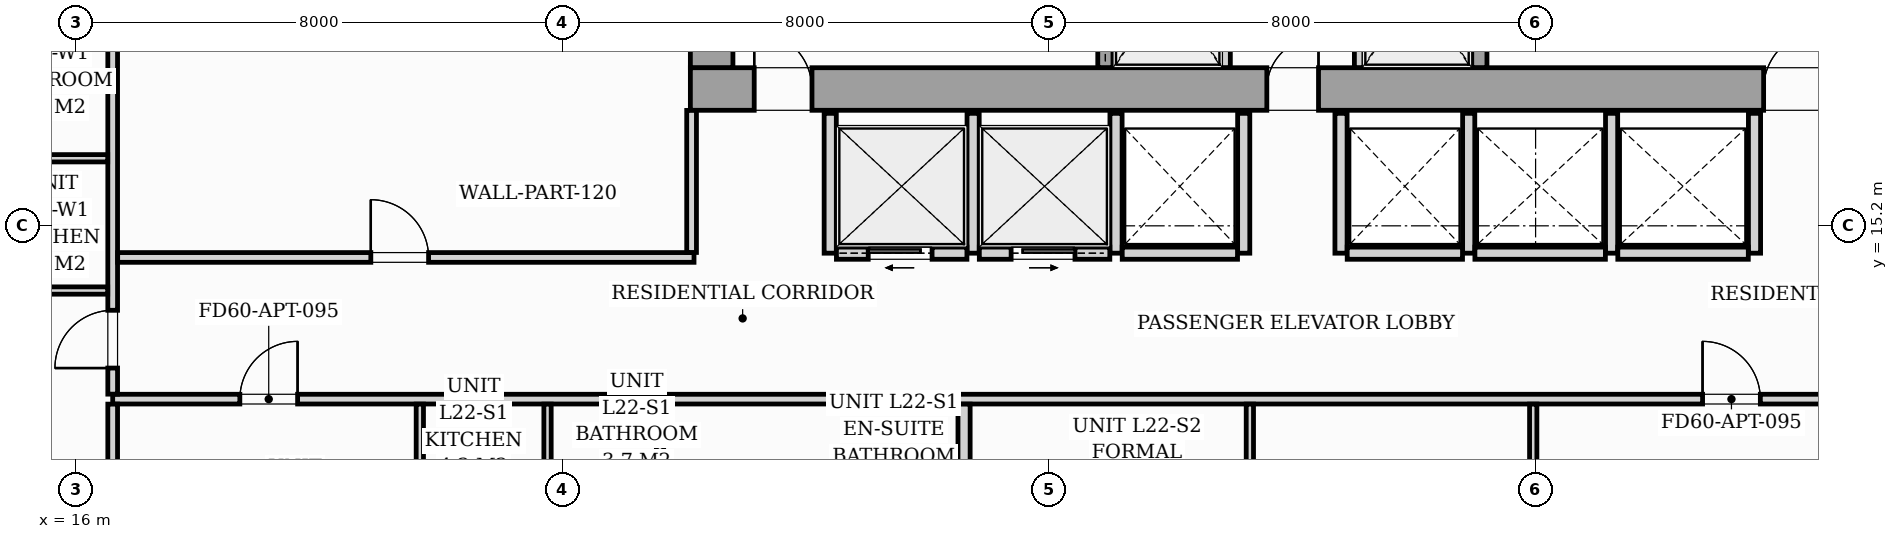
"""IFC4 building model, lengths in metres.
Left out: names, types, materials, properties, quantities, classifications, styles, units other than length and angle.
Written with IfcOpenShell. Run it as: python <this file> out.ifc"""

import sys

from ifc_helpers import new_model, si_unit, direction, frame, frame_2d, origin, origin_2d, place, context, subcontext, project, spatial, rectangle, i_section, extrude, source, transform, mapped, element, fill, save


model = new_model("IFC4")
c1 = context("Model", 3, precision=1e-05, world=origin(), true_north=direction((0.0, 1.0)))
c2 = subcontext(c1, "Body", "Model", "MODEL_VIEW")
j1 = project(units=[si_unit("LENGTHUNIT", "METRE"), si_unit("PLANEANGLEUNIT", "RADIAN")], contexts=[c1])
p1 = place(None, origin())
s1 = spatial("IfcSite", under=j1, at=p1, CompositionType="ELEMENT")
p2 = place(p1, origin())
s2 = spatial("IfcBuilding", under=s1, at=p2, CompositionType="ELEMENT")
p3 = place(p2, frame((0.0, 0.0, 81.0)))
s3 = spatial("IfcBuildingStorey", under=s2, at=p3, CompositionType="ELEMENT", Elevation=81.0)
m1 = source(origin(), c2, "Body", "SweptSolid", [
    extrude(i_section(OverallWidth=0.427, OverallDepth=0.483, WebThickness=0.051, FlangeThickness=0.082, FilletRadius=0.018, at=origin_2d()), origin(), (0.0, 0.0, 1.0), 3.196),
])
for number, where, z_axis, x_axis in (
    (1, (26.4, 17.4, 0.002), (0.0, 0.0, 1.0), (1.0, 0.0, 0.0)),
    (2, (33.12, 17.4, 0.002), (0.0, 0.0, 1.0), (1.0, 0.0, 0.0)),
    (3, (38.88, 17.4, 0.002), (0.0, 0.0, 1.0), (1.0, 0.0, 0.0)),
):
    element("IfcColumn", number, at=place(p3, frame(where, z_axis=z_axis, x_axis=x_axis)), inside=s3, PredefinedType="PILASTER", context=c2, shape_type="MappedRepresentation", body=[
        mapped(m1, transform((0.0, 0.0, 0.0), scale=1.0)),
    ])
p4 = place(p3, frame((26.1, 17.45, 0.0), z_axis=(0.0, 0.0, 1.0), x_axis=(1.0, 0.0, 0.0)))
e4 = element("IfcWall", 4, at=p4, inside=s3, PredefinedType="SHEAR", context=c2, shape_type="SweptSolid", body=[
    extrude(rectangle(XDim=19.8, YDim=0.7, at=frame_2d((9.9, 0.0))), origin(), (0.0, 0.0, 1.0), 3.2),
])
p5 = place(p4, frame((1.05, 0.0, 0.0)))
e5 = element("IfcOpeningElement", 5, at=p5, cuts=e4, PredefinedType="OPENING", context=c2, shape_type="SweptSolid", body=[
    extrude(rectangle(XDim=0.95, YDim=2.06, at=frame_2d((0.475, 1.03))), frame((0.0, 0.36, 0.0), z_axis=(0.0, -1.0, 0.0), x_axis=(1.0, 0.0, 0.0)), (0.0, 0.0, 1.0), 0.72),
])
p6 = place(p4, frame((9.48, 0.0, 0.0)))
e6 = element("IfcOpeningElement", 6, at=p6, cuts=e4, PredefinedType="OPENING", context=c2, shape_type="SweptSolid", body=[
    extrude(rectangle(XDim=0.85, YDim=2.0, at=frame_2d((0.425, 1.0))), frame((0.0, 0.36, 0.0), z_axis=(0.0, -1.0, 0.0), x_axis=(1.0, 0.0, 0.0)), (0.0, 0.0, 1.0), 0.72),
])
p7 = place(p4, frame((17.65, 0.0, 0.0)))
e7 = element("IfcOpeningElement", 7, at=p7, cuts=e4, PredefinedType="OPENING", context=c2, shape_type="SweptSolid", body=[
    extrude(rectangle(XDim=0.95, YDim=2.06, at=frame_2d((0.475, 1.03))), frame((0.0, 0.36, 0.0), z_axis=(0.0, -1.0, 0.0), x_axis=(1.0, 0.0, 0.0)), (0.0, 0.0, 1.0), 0.72),
])
p8 = place(p3, frame((26.45, 17.802, 0.0), z_axis=(0.0, 0.0, 1.0), x_axis=(0.0, 1.0, 0.0)))
e8 = element("IfcWall", 8, at=p8, inside=s3, PredefinedType="SHEAR", context=c2, shape_type="SweptSolid", body=[
    extrude(rectangle(XDim=5.796, YDim=0.7, at=frame_2d((2.898, 0.0))), origin(), (0.0, 0.0, 1.0), 3.2),
])
p9 = place(p3, frame((32.925, 17.802, 0.0), z_axis=(0.0, 0.0, 1.0), x_axis=(0.0, 1.0, 0.0)))
e9 = element("IfcWall", 9, at=p9, inside=s3, PredefinedType="SOLIDWALL", context=c2, shape_type="SweptSolid", body=[
    extrude(rectangle(XDim=2.646, YDim=0.25, at=frame_2d((1.323, 0.0))), origin(), (0.0, 0.0, 1.0), 3.2),
])
p10 = place(p9, frame((0.598, 0.0, 0.0)))
e10 = element("IfcOpeningElement", 10, at=p10, cuts=e9, PredefinedType="OPENING", context=c2, shape_type="SweptSolid", body=[
    extrude(rectangle(XDim=1.1, YDim=2.08, at=frame_2d((0.55, 1.04))), frame((0.0, 0.135, 0.0), z_axis=(0.0, -1.0, 0.0), x_axis=(1.0, 0.0, 0.0)), (0.0, 0.0, 1.0), 0.27),
])
for number, where, z_axis, x_axis in (
    (11, (34.9, 17.802, 0.0), (0.0, 0.0, 1.0), (0.0, 1.0, 0.0)),
    (12, (37.1, 17.802, 0.0), (0.0, 0.0, 1.0), (0.0, 1.0, 0.0)),
):
    element("IfcWall", number, at=place(p3, frame(where, z_axis=z_axis, x_axis=x_axis)), inside=s3, PredefinedType="PARTITIONING", context=c2, shape_type="SweptSolid", body=[
        extrude(rectangle(XDim=2.646, YDim=0.16, at=frame_2d((1.323, 0.0))), origin(), (0.0, 0.0, 1.0), 2.94),
    ])
p11 = place(p3, frame((39.075, 17.802, 0.0), z_axis=(0.0, 0.0, 1.0), x_axis=(0.0, 1.0, 0.0)))
e13 = element("IfcWall", 13, at=p11, inside=s3, PredefinedType="SOLIDWALL", context=c2, shape_type="SweptSolid", body=[
    extrude(rectangle(XDim=2.646, YDim=0.25, at=frame_2d((1.323, 0.0))), origin(), (0.0, 0.0, 1.0), 3.2),
])
p12 = place(p11, frame((0.598, 0.0, 0.0)))
e14 = element("IfcOpeningElement", 14, at=p12, cuts=e13, PredefinedType="OPENING", context=c2, shape_type="SweptSolid", body=[
    extrude(rectangle(XDim=1.1, YDim=2.08, at=frame_2d((0.55, 1.04))), frame((0.0, 0.135, 0.0), z_axis=(0.0, -1.0, 0.0), x_axis=(1.0, 0.0, 0.0)), (0.0, 0.0, 1.0), 0.27),
])
for number, where, z_axis, x_axis in (
    (15, (28.4, 14.75, 0.0), (0.0, 0.0, 1.0), (0.0, 1.0, 0.0)),
    (16, (30.75, 14.75, 0.0), (0.0, 0.0, 1.0), (0.0, 1.0, 0.0)),
    (17, (33.1, 14.75, 0.0), (0.0, 0.0, 1.0), (0.0, 1.0, 0.0)),
):
    element("IfcWall", number, at=place(p3, frame(where, z_axis=z_axis, x_axis=x_axis)), inside=s3, PredefinedType="PARTITIONING", context=c2, shape_type="SweptSolid", body=[
        extrude(rectangle(XDim=2.3, YDim=0.2, at=frame_2d((1.15, 0.0))), origin(), (0.0, 0.0, 1.0), 2.94),
    ])
p13 = place(p3, frame((28.502, 14.75, 0.0), z_axis=(0.0, 0.0, 1.0), x_axis=(1.0, 0.0, 0.0)))
e18 = element("IfcWall", 18, at=p13, inside=s3, PredefinedType="PARTITIONING", context=c2, shape_type="SweptSolid", body=[
    extrude(rectangle(XDim=2.146, YDim=0.2, at=frame_2d((1.073, 0.0))), origin(), (0.0, 0.0, 1.0), 2.94),
])
p14 = place(p13, frame((0.523, 0.0, 0.0)))
e19 = element("IfcOpeningElement", 19, at=p14, cuts=e18, PredefinedType="OPENING", context=c2, shape_type="SweptSolid", body=[
    extrude(rectangle(XDim=1.05, YDim=2.08, at=frame_2d((0.525, 1.04))), frame((0.0, 0.11, 0.0), z_axis=(0.0, -1.0, 0.0), x_axis=(1.0, 0.0, 0.0)), (0.0, 0.0, 1.0), 0.22),
])
p15 = place(p3, frame((30.852, 14.75, 0.0), z_axis=(0.0, 0.0, 1.0), x_axis=(1.0, 0.0, 0.0)))
e20 = element("IfcWall", 20, at=p15, inside=s3, PredefinedType="PARTITIONING", context=c2, shape_type="SweptSolid", body=[
    extrude(rectangle(XDim=2.146, YDim=0.2, at=frame_2d((1.073, 0.0))), origin(), (0.0, 0.0, 1.0), 2.94),
])
p16 = place(p15, frame((0.523, 0.0, 0.0)))
e21 = element("IfcOpeningElement", 21, at=p16, cuts=e20, PredefinedType="OPENING", context=c2, shape_type="SweptSolid", body=[
    extrude(rectangle(XDim=1.05, YDim=2.08, at=frame_2d((0.525, 1.04))), frame((0.0, 0.11, 0.0), z_axis=(0.0, -1.0, 0.0), x_axis=(1.0, 0.0, 0.0)), (0.0, 0.0, 1.0), 0.22),
])
p17 = place(p3, frame((35.2, 14.75, 0.0), z_axis=(0.0, 0.0, 1.0), x_axis=(0.0, 1.0, 0.0)))
e22 = element("IfcWall", 22, at=p17, inside=s3, PredefinedType="PARTITIONING", context=c2, shape_type="SweptSolid", body=[
    extrude(rectangle(XDim=2.3, YDim=0.2, at=frame_2d((1.15, 0.0))), origin(), (0.0, 0.0, 1.0), 2.94),
])
p18 = place(p3, frame((33.202, 14.75, 0.0), z_axis=(0.0, 0.0, 1.0), x_axis=(1.0, 0.0, 0.0)))
e23 = element("IfcWall", 23, at=p18, inside=s3, PredefinedType="PARTITIONING", context=c2, shape_type="SweptSolid", body=[
    extrude(rectangle(XDim=1.896, YDim=0.2, at=frame_2d((0.948, 0.0))), origin(), (0.0, 0.0, 1.0), 2.94),
])
for number, where, z_axis, x_axis in (
    (24, (36.8, 14.75, 0.0), (0.0, 0.0, 1.0), (0.0, 1.0, 0.0)),
    (25, (38.9, 14.75, 0.0), (0.0, 0.0, 1.0), (0.0, 1.0, 0.0)),
):
    element("IfcWall", number, at=place(p3, frame(where, z_axis=z_axis, x_axis=x_axis)), inside=s3, PredefinedType="PARTITIONING", context=c2, shape_type="SweptSolid", body=[
        extrude(rectangle(XDim=2.3, YDim=0.2, at=frame_2d((1.15, 0.0))), origin(), (0.0, 0.0, 1.0), 2.94),
    ])
p19 = place(p3, frame((36.902, 14.75, 0.0), z_axis=(0.0, 0.0, 1.0), x_axis=(1.0, 0.0, 0.0)))
e26 = element("IfcWall", 26, at=p19, inside=s3, PredefinedType="PARTITIONING", context=c2, shape_type="SweptSolid", body=[
    extrude(rectangle(XDim=1.896, YDim=0.2, at=frame_2d((0.948, 0.0))), origin(), (0.0, 0.0, 1.0), 2.94),
])
for number, where, z_axis, x_axis in (
    (27, (41.25, 14.75, 0.0), (0.0, 0.0, 1.0), (0.0, 1.0, 0.0)),
    (28, (43.6, 14.75, 0.0), (0.0, 0.0, 1.0), (0.0, 1.0, 0.0)),
):
    element("IfcWall", number, at=place(p3, frame(where, z_axis=z_axis, x_axis=x_axis)), inside=s3, PredefinedType="PARTITIONING", context=c2, shape_type="SweptSolid", body=[
        extrude(rectangle(XDim=2.3, YDim=0.2, at=frame_2d((1.15, 0.0))), origin(), (0.0, 0.0, 1.0), 2.94),
    ])
for number, where, z_axis, x_axis in (
    (29, (39.002, 14.75, 0.0), (0.0, 0.0, 1.0), (1.0, 0.0, 0.0)),
    (30, (41.352, 14.75, 0.0), (0.0, 0.0, 1.0), (1.0, 0.0, 0.0)),
):
    element("IfcWall", number, at=place(p3, frame(where, z_axis=z_axis, x_axis=x_axis)), inside=s3, PredefinedType="PARTITIONING", context=c2, shape_type="SweptSolid", body=[
        extrude(rectangle(XDim=2.146, YDim=0.2, at=frame_2d((1.073, 0.0))), origin(), (0.0, 0.0, 1.0), 2.94),
    ])
p20 = place(p3, frame((16.6, 12.35, 0.0), z_axis=(0.0, 0.0, 1.0), x_axis=(1.0, 0.0, 0.0)))
e31 = element("IfcWall", 31, at=p20, inside=s3, PredefinedType="PARTITIONING", context=c2, shape_type="SweptSolid", body=[
    extrude(rectangle(XDim=37.6, YDim=0.16, at=frame_2d((18.8, 0.0))), origin(), (0.0, 0.0, 1.0), 2.94),
])
p21 = place(p20, frame((2.091, 0.0, 0.0)))
e32 = element("IfcOpeningElement", 32, at=p21, cuts=e31, PredefinedType="OPENING", context=c2, shape_type="SweptSolid", body=[
    extrude(rectangle(XDim=0.95, YDim=2.06, at=frame_2d((0.475, 1.03))), frame((0.0, 0.09, 0.0), z_axis=(0.0, -1.0, 0.0), x_axis=(1.0, 0.0, 0.0)), (0.0, 0.0, 1.0), 0.18),
])
p22 = place(p20, frame((26.146, 0.0, 0.0)))
e33 = element("IfcOpeningElement", 33, at=p22, cuts=e31, PredefinedType="OPENING", context=c2, shape_type="SweptSolid", body=[
    extrude(rectangle(XDim=0.95, YDim=2.06, at=frame_2d((0.475, 1.03))), frame((0.0, 0.09, 0.0), z_axis=(0.0, -1.0, 0.0), x_axis=(1.0, 0.0, 0.0)), (0.0, 0.0, 1.0), 0.18),
])
p23 = place(p3, frame((16.6, 4.341, 0.0), z_axis=(0.0, 0.0, 1.0), x_axis=(0.0, 1.0, 0.0)))
e34 = element("IfcWall", 34, at=p23, inside=s3, PredefinedType="PARTITIONING", context=c2, shape_type="SweptSolid", body=[
    extrude(rectangle(XDim=7.927, YDim=0.16, at=frame_2d((3.964, 0.0))), origin(), (0.0, 0.0, 1.0), 2.94),
])
p24 = place(p3, frame((16.6, 12.432, 0.0), z_axis=(0.0, 0.0, 1.0), x_axis=(0.0, 1.0, 0.0)))
e35 = element("IfcWall", 35, at=p24, inside=s3, PredefinedType="PARTITIONING", context=c2, shape_type="SweptSolid", body=[
    extrude(rectangle(XDim=11.475, YDim=0.16, at=frame_2d((5.738, 0.0))), origin(), (0.0, 0.0, 1.0), 2.94),
])
p25 = place(p24, frame((0.429, 0.0, 0.0)))
e36 = element("IfcOpeningElement", 36, at=p25, cuts=e35, PredefinedType="OPENING", context=c2, shape_type="SweptSolid", body=[
    extrude(rectangle(XDim=0.95, YDim=2.06, at=frame_2d((0.475, 1.03))), frame((0.0, 0.09, 0.0), z_axis=(0.0, -1.0, 0.0), x_axis=(1.0, 0.0, 0.0)), (0.0, 0.0, 1.0), 0.18),
])
p26 = place(p3, frame((25.601, 5.208, 0.0), z_axis=(0.0, 0.0, 1.0), x_axis=(0.0, 1.0, 0.0)))
e37 = element("IfcWall", 37, at=p26, inside=s3, PredefinedType="PARTITIONING", context=c2, shape_type="SweptSolid", body=[
    extrude(rectangle(XDim=7.061, YDim=0.12, at=frame_2d((3.53, 0.0))), origin(), (0.0, 0.0, 1.0), 2.94),
])
p27 = place(p26, frame((3.792, 0.0, 0.0)))
e38 = element("IfcOpeningElement", 38, at=p27, cuts=e37, PredefinedType="OPENING", context=c2, shape_type="SweptSolid", body=[
    extrude(rectangle(XDim=0.9, YDim=2.05, at=frame_2d((0.45, 1.025))), frame((0.0, 0.07, 0.0), z_axis=(0.0, -1.0, 0.0), x_axis=(1.0, 0.0, 0.0)), (0.0, 0.0, 1.0), 0.14),
])
for number, where, z_axis, x_axis in (
    (39, (23.751, 10.162, 0.0), (0.0, 0.0, 1.0), (0.0, 1.0, 0.0)),
    (40, (21.651, 10.162, 0.0), (0.0, 0.0, 1.0), (0.0, 1.0, 0.0)),
):
    element("IfcWall", number, at=place(p3, frame(where, z_axis=z_axis, x_axis=x_axis)), inside=s3, PredefinedType="PARTITIONING", context=c2, shape_type="SweptSolid", body=[
        extrude(rectangle(XDim=2.106, YDim=0.12, at=frame_2d((1.053, 0.0))), origin(), (0.0, 0.0, 1.0), 2.94),
    ])
p28 = place(p3, frame((30.601, 10.112, 0.0), z_axis=(0.0, 0.0, 1.0), x_axis=(0.0, 1.0, 0.0)))
e41 = element("IfcWall", 41, at=p28, inside=s3, PredefinedType="PARTITIONING", context=c2, shape_type="SweptSolid", body=[
    extrude(rectangle(XDim=2.156, YDim=0.2, at=frame_2d((1.078, 0.0))), origin(), (0.0, 0.0, 1.0), 2.94),
])
p29 = place(p3, frame((35.301, 5.958, 0.0), z_axis=(0.0, 0.0, 1.0), x_axis=(0.0, 1.0, 0.0)))
e42 = element("IfcWall", 42, at=p29, inside=s3, PredefinedType="PARTITIONING", context=c2, shape_type="SweptSolid", body=[
    extrude(rectangle(XDim=6.31, YDim=0.12, at=frame_2d((3.155, 0.0))), origin(), (0.0, 0.0, 1.0), 2.94),
])
p30 = place(p29, frame((2.758, 0.0, 0.0)))
e43 = element("IfcOpeningElement", 43, at=p30, cuts=e42, PredefinedType="OPENING", context=c2, shape_type="SweptSolid", body=[
    extrude(rectangle(XDim=0.85, YDim=2.05, at=frame_2d((0.425, 1.025))), frame((0.0, 0.07, 0.0), z_axis=(0.0, -1.0, 0.0), x_axis=(1.0, 0.0, 0.0)), (0.0, 0.0, 1.0), 0.14),
])
p31 = place(p3, frame((39.961, 6.407, 0.0), z_axis=(0.0, 0.0, 1.0), x_axis=(0.0, 1.0, 0.0)))
e44 = element("IfcWall", 44, at=p31, inside=s3, PredefinedType="PARTITIONING", context=c2, shape_type="SweptSolid", body=[
    extrude(rectangle(XDim=5.861, YDim=0.12, at=frame_2d((2.93, 0.0))), origin(), (0.0, 0.0, 1.0), 2.94),
])
p32 = place(p31, frame((2.365, 0.0, 0.0)))
e45 = element("IfcOpeningElement", 45, at=p32, cuts=e44, PredefinedType="OPENING", context=c2, shape_type="SweptSolid", body=[
    extrude(rectangle(XDim=0.85, YDim=2.05, at=frame_2d((0.425, 1.025))), frame((0.0, 0.07, 0.0), z_axis=(0.0, -1.0, 0.0), x_axis=(1.0, 0.0, 0.0)), (0.0, 0.0, 1.0), 0.14),
])
for number, where, z_axis, x_axis in (
    (46, (14.262, 16.311, 0.0), (0.0, 0.0, 1.0), (1.0, 0.0, 0.0)),
    (47, (14.262, 14.136, 0.0), (0.0, 0.0, 1.0), (1.0, 0.0, 0.0)),
):
    element("IfcWall", number, at=place(p3, frame(where, z_axis=z_axis, x_axis=x_axis)), inside=s3, PredefinedType="PARTITIONING", context=c2, shape_type="SweptSolid", body=[
        extrude(rectangle(XDim=2.256, YDim=0.12, at=frame_2d((1.128, 0.0))), origin(), (0.0, 0.0, 1.0), 2.94),
    ])
p33 = place(p3, frame((16.682, 14.68, 0.0), z_axis=(0.0, 0.0, 1.0), x_axis=(1.0, 0.0, 0.0)))
e48 = element("IfcWall", 48, at=p33, inside=s3, PredefinedType="PARTITIONING", context=c2, shape_type="SweptSolid", body=[
    extrude(rectangle(XDim=9.478, YDim=0.16, at=frame_2d((4.739, 0.0))), origin(), (0.0, 0.0, 1.0), 2.94),
])
p34 = place(p33, frame((4.163, 0.0, 0.0)))
e49 = element("IfcOpeningElement", 49, at=p34, cuts=e48, PredefinedType="OPENING", context=c2, shape_type="SweptSolid", body=[
    extrude(rectangle(XDim=0.95, YDim=2.06, at=frame_2d((0.475, 1.03))), frame((0.0, 0.09, 0.0), z_axis=(0.0, -1.0, 0.0), x_axis=(1.0, 0.0, 0.0)), (0.0, 0.0, 1.0), 0.18),
])
p35 = place(p3, frame((26.12, 14.762, 0.0), z_axis=(0.0, 0.0, 1.0), x_axis=(0.0, 1.0, 0.0)))
e50 = element("IfcWall", 50, at=p35, inside=s3, PredefinedType="PARTITIONING", context=c2, shape_type="SweptSolid", body=[
    extrude(rectangle(XDim=2.336, YDim=0.16, at=frame_2d((1.168, 0.0))), origin(), (0.0, 0.0, 1.0), 2.94),
])
m2 = source(origin(), c2, "Body", "SweptSolid", [
    extrude(rectangle(XDim=0.95, YDim=2.06, at=frame_2d((0.475, 1.03))), frame((0.0, 0.025, 0.0), z_axis=(0.0, -1.0, 0.0), x_axis=(1.0, 0.0, 0.0)), (0.0, 0.0, 1.0), 0.05),
])
p36 = place(p5, origin())
e51 = element("IfcDoor", 51, at=p36, inside=s3, OperationType="SINGLE_SWING_LEFT", PredefinedType="DOOR", context=c2, shape_type="MappedRepresentation", body=[
    mapped(m2, transform((0.0, 0.0, 0.0), scale=1.0)),
])
fill(e5, e51)
m3 = source(origin(), c2, "Body", "SweptSolid", [
    extrude(rectangle(XDim=0.85, YDim=2.0, at=frame_2d((0.425, 1.0))), frame((0.0, 0.025, 0.0), z_axis=(0.0, -1.0, 0.0), x_axis=(1.0, 0.0, 0.0)), (0.0, 0.0, 1.0), 0.05),
])
p37 = place(p6, origin())
e52 = element("IfcDoor", 52, at=p37, inside=s3, OperationType="SINGLE_SWING_RIGHT", PredefinedType="DOOR", context=c2, shape_type="MappedRepresentation", body=[
    mapped(m3, transform((0.0, 0.0, 0.0), scale=1.0)),
])
fill(e6, e52)
p38 = place(p7, origin())
e53 = element("IfcDoor", 53, at=p38, inside=s3, OperationType="SINGLE_SWING_RIGHT", PredefinedType="DOOR", context=c2, shape_type="MappedRepresentation", body=[
    mapped(m2, transform((0.0, 0.0, 0.0), scale=1.0)),
])
fill(e7, e53)
m4 = source(origin(), c2, "Body", "SweptSolid", [
    extrude(rectangle(XDim=1.05, YDim=2.08, at=frame_2d((0.525, 1.04))), frame((0.0, 0.025, 0.0), z_axis=(0.0, -1.0, 0.0), x_axis=(1.0, 0.0, 0.0)), (0.0, 0.0, 1.0), 0.05),
])
p39 = place(p14, origin())
e54 = element("IfcDoor", 54, at=p39, inside=s3, OperationType="SLIDING_TO_LEFT", PredefinedType="DOOR", context=c2, shape_type="MappedRepresentation", body=[
    mapped(m4, transform((0.0, 0.0, 0.0), scale=1.0)),
])
fill(e19, e54)
p40 = place(p16, origin())
e55 = element("IfcDoor", 55, at=p40, inside=s3, OperationType="SLIDING_TO_RIGHT", PredefinedType="DOOR", context=c2, shape_type="MappedRepresentation", body=[
    mapped(m4, transform((0.0, 0.0, 0.0), scale=1.0)),
])
fill(e21, e55)
m5 = source(origin(), c2, "Body", "SweptSolid", [
    extrude(rectangle(XDim=0.95, YDim=2.06, at=frame_2d((0.475, 1.03))), frame((0.0, 0.025, 0.0), z_axis=(0.0, -1.0, 0.0), x_axis=(1.0, 0.0, 0.0)), (0.0, 0.0, 1.0), 0.05),
])
p41 = place(p21, origin())
e56 = element("IfcDoor", 56, at=p41, inside=s3, OperationType="SINGLE_SWING_RIGHT", PredefinedType="DOOR", context=c2, shape_type="MappedRepresentation", body=[
    mapped(m5, transform((0.0, 0.0, 0.0), scale=1.0)),
])
fill(e32, e56)
p42 = place(p22, origin())
e57 = element("IfcDoor", 57, at=p42, inside=s3, OperationType="SINGLE_SWING_LEFT", PredefinedType="DOOR", context=c2, shape_type="MappedRepresentation", body=[
    mapped(m5, transform((0.0, 0.0, 0.0), scale=1.0)),
])
fill(e33, e57)
p43 = place(p25, origin())
e58 = element("IfcDoor", 58, at=p43, inside=s3, OperationType="SINGLE_SWING_LEFT", PredefinedType="DOOR", context=c2, shape_type="MappedRepresentation", body=[
    mapped(m5, transform((0.0, 0.0, 0.0), scale=1.0)),
])
fill(e36, e58)
p44 = place(p34, origin())
e59 = element("IfcDoor", 59, at=p44, inside=s3, OperationType="SINGLE_SWING_LEFT", PredefinedType="DOOR", context=c2, shape_type="MappedRepresentation", body=[
    mapped(m5, transform((0.0, 0.0, 0.0), scale=1.0)),
])
fill(e49, e59)
save(model, sys.argv[1])
